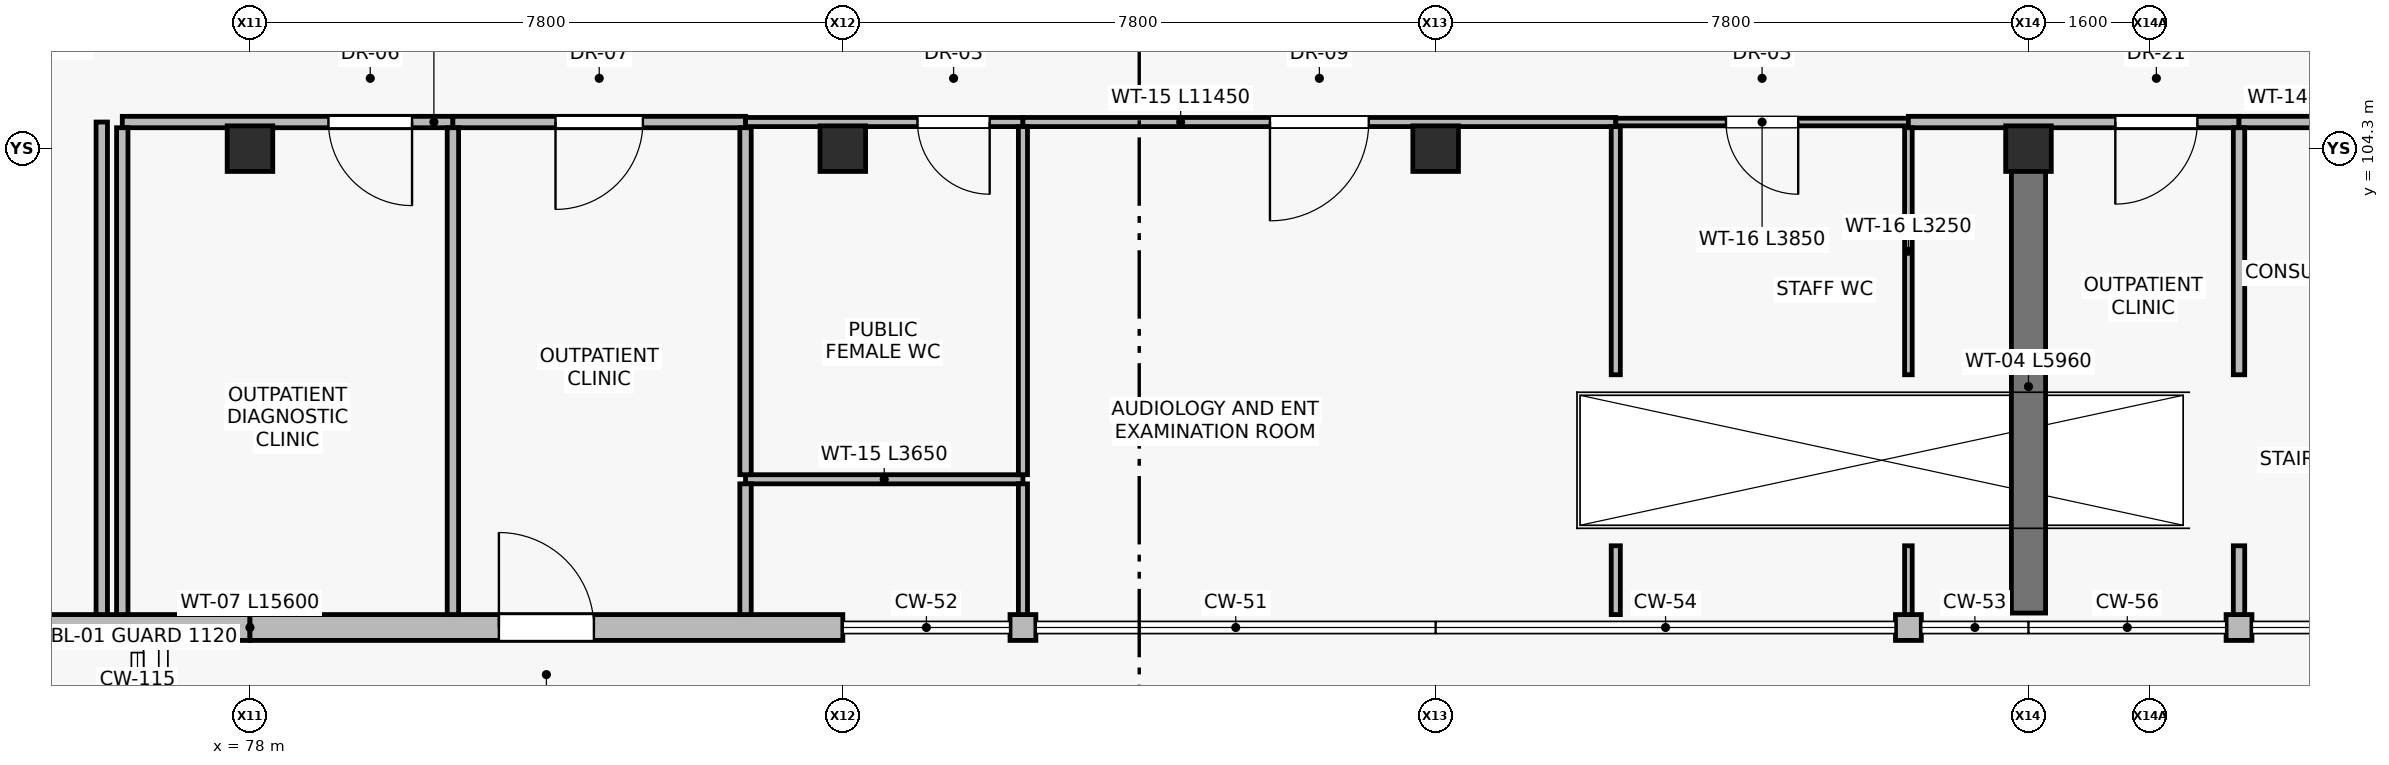
"""IFC4 building model, lengths in metres.
Left out: names, types, materials, properties, quantities, classifications, styles, units other than length and angle.
Written with IfcOpenShell. Run it as: python <this file> out.ifc"""

import sys

from ifc_helpers import new_model, si_unit, direction, frame, frame_2d, origin, origin_2d, place, context, subcontext, project, spatial, rectangle, extrude, element, fill, save


model = new_model("IFC4")
c1 = context("Model", 3, precision=1e-05, world=origin(), true_north=direction((0.0, 1.0)))
c2 = subcontext(c1, "Body", "Model", "MODEL_VIEW")
j1 = project(units=[si_unit("LENGTHUNIT", "METRE"), si_unit("PLANEANGLEUNIT", "RADIAN")], contexts=[c1])
p1 = place(None, origin())
s1 = spatial("IfcSite", under=j1, at=p1, CompositionType="ELEMENT")
p2 = place(p1, origin())
s2 = spatial("IfcBuilding", under=s1, at=p2, CompositionType="ELEMENT")
p3 = place(p2, frame((0.0, 0.0, 4.8)))
s3 = spatial("IfcBuildingStorey", under=s2, at=p3, CompositionType="ELEMENT", Elevation=4.8)
for number, where, z_axis, x_axis in (
    (1, (78.0, 104.3, 0.0), (0.0, 0.0, 1.0), (1.0, 0.0, 0.0)),
    (2, (85.8, 104.3, 0.0), (0.0, 0.0, 1.0), (1.0, 0.0, 0.0)),
    (3, (93.6, 104.3, 0.0), (0.0, 0.0, 1.0), (1.0, 0.0, 0.0)),
    (4, (101.4, 104.3, 0.0), (0.0, 0.0, 1.0), (1.0, 0.0, 0.0)),
):
    element("IfcColumn", number, at=place(p3, frame(where, z_axis=z_axis, x_axis=x_axis)), inside=s3, PredefinedType="COLUMN", context=c2, shape_type="SweptSolid", body=[
        extrude(rectangle(XDim=0.6, YDim=0.6, at=origin_2d()), origin(), (0.0, 0.0, 1.0), 4.8),
    ])
p4 = place(p3, frame((78.0, 98.0, 0.0), z_axis=(0.0, 0.0, 1.0), x_axis=(-1.0, 0.0, 0.0)))
e5 = element("IfcWall", 5, at=p4, inside=s3, PredefinedType="STANDARD", context=c2, shape_type="SweptSolid", body=[
    extrude(rectangle(XDim=7.8, YDim=0.34, at=frame_2d((3.9, 0.0))), origin(), (0.0, 0.0, 1.0), 4.54),
])
p5 = place(p4, frame((2.8, 0.0, 0.0)))
e6 = element("IfcOpeningElement", 6, at=p5, cuts=e5, PredefinedType="OPENING", context=c2, shape_type="SweptSolid", body=[
    extrude(rectangle(XDim=1.6, YDim=2.2, at=frame_2d((0.8, 1.1))), frame((0.0, 0.18, 0.0), z_axis=(0.0, -1.0, 0.0), x_axis=(1.0, 0.0, 0.0)), (0.0, 0.0, 1.0), 0.36),
])
p6 = place(p3, frame((85.8, 98.0, 0.0), z_axis=(0.0, 0.0, 1.0), x_axis=(-1.0, 0.0, 0.0)))
e7 = element("IfcWall", 7, at=p6, inside=s3, PredefinedType="STANDARD", context=c2, shape_type="SweptSolid", body=[
    extrude(rectangle(XDim=7.8, YDim=0.34, at=frame_2d((3.9, 0.0))), origin(), (0.0, 0.0, 1.0), 4.54),
])
p7 = place(p6, frame((3.275, 0.0, 0.0)))
e8 = element("IfcOpeningElement", 8, at=p7, cuts=e7, PredefinedType="OPENING", context=c2, shape_type="SweptSolid", body=[
    extrude(rectangle(XDim=1.25, YDim=2.2, at=frame_2d((0.625, 1.1))), frame((0.0, 0.18, 0.0), z_axis=(0.0, -1.0, 0.0), x_axis=(1.0, 0.0, 0.0)), (0.0, 0.0, 1.0), 0.36),
])
for number, where, z_axis, x_axis in (
    (9, (88.34, 98.0, 0.0), (0.0, 0.0, 1.0), (-1.0, 0.0, 0.0)),
    (10, (99.99, 98.0, 0.0), (0.0, 0.0, 1.0), (-1.0, 0.0, 0.0)),
    (11, (104.34, 98.0, 0.0), (0.0, 0.0, 1.0), (-1.0, 0.0, 0.0)),
):
    element("IfcWall", number, at=place(p3, frame(where, z_axis=z_axis, x_axis=x_axis)), inside=s3, PredefinedType="STANDARD", context=c2, shape_type="SweptSolid", body=[
        extrude(rectangle(XDim=0.34, YDim=0.34, at=frame_2d((0.17, 0.0))), origin(), (0.0, 0.0, 1.0), 4.54),
    ])
p8 = place(p3, frame((101.4, 98.19, 0.0), z_axis=(0.0, 0.0, 1.0), x_axis=(0.0, 1.0, 0.0)))
e12 = element("IfcWall", 12, at=p8, inside=s3, PredefinedType="SHEAR", context=c2, shape_type="SweptSolid", body=[
    extrude(rectangle(XDim=5.96, YDim=0.45, at=frame_2d((2.98, 0.0))), origin(), (0.0, 0.0, 1.0), 4.54),
])
p9 = place(p3, frame((76.05, 98.17, 0.0), z_axis=(0.0, 0.0, 1.0), x_axis=(0.0, 1.0, 0.0)))
e13 = element("IfcWall", 13, at=p9, inside=s3, PredefinedType="PARTITIONING", context=c2, shape_type="SweptSolid", body=[
    extrude(rectangle(XDim=6.48, YDim=0.15, at=frame_2d((3.24, 0.0))), origin(), (0.0, 0.0, 1.0), 4.54),
])
p10 = place(p3, frame((80.67, 104.65, 0.0), z_axis=(0.0, 0.0, 1.0), x_axis=(-1.0, 0.0, 0.0)))
e14 = element("IfcWall", 14, at=p10, inside=s3, PredefinedType="PARTITIONING", context=c2, shape_type="SweptSolid", body=[
    extrude(rectangle(XDim=4.35, YDim=0.15, at=frame_2d((2.175, 0.0))), origin(), (0.0, 0.0, 1.0), 4.04),
])
p11 = place(p10, frame((0.538, 0.0, 0.0)))
e15 = element("IfcOpeningElement", 15, at=p11, cuts=e14, PredefinedType="OPENING", context=c2, shape_type="SweptSolid", body=[
    extrude(rectangle(XDim=1.1, YDim=2.15, at=frame_2d((0.55, 1.075))), frame((0.0, 0.085, 0.0), z_axis=(0.0, -1.0, 0.0), x_axis=(1.0, 0.0, 0.0)), (0.0, 0.0, 1.0), 0.17),
])
p12 = place(p3, frame((84.52, 104.65, 0.0), z_axis=(0.0, 0.0, 1.0), x_axis=(-1.0, 0.0, 0.0)))
e16 = element("IfcWall", 16, at=p12, inside=s3, PredefinedType="PARTITIONING", context=c2, shape_type="SweptSolid", body=[
    extrude(rectangle(XDim=3.85, YDim=0.15, at=frame_2d((1.925, 0.0))), origin(), (0.0, 0.0, 1.0), 4.04),
])
p13 = place(p12, frame((1.35, 0.0, 0.0)))
e17 = element("IfcOpeningElement", 17, at=p13, cuts=e16, PredefinedType="OPENING", context=c2, shape_type="SweptSolid", body=[
    extrude(rectangle(XDim=1.15, YDim=2.2, at=frame_2d((0.575, 1.1))), frame((0.0, 0.085, 0.0), z_axis=(0.0, -1.0, 0.0), x_axis=(1.0, 0.0, 0.0)), (0.0, 0.0, 1.0), 0.17),
])
p14 = place(p3, frame((88.17, 104.65, 0.0), z_axis=(0.0, 0.0, 1.0), x_axis=(-1.0, 0.0, 0.0)))
e18 = element("IfcWall", 18, at=p14, inside=s3, PredefinedType="PARTITIONING", context=c2, shape_type="SweptSolid", body=[
    extrude(rectangle(XDim=3.65, YDim=0.12, at=frame_2d((1.825, 0.0))), origin(), (0.0, 0.0, 1.0), 4.04),
])
p15 = place(p14, frame((0.438, 0.0, 0.0)))
e19 = element("IfcOpeningElement", 19, at=p15, cuts=e18, PredefinedType="OPENING", context=c2, shape_type="SweptSolid", body=[
    extrude(rectangle(XDim=0.95, YDim=2.1, at=frame_2d((0.475, 1.05))), frame((0.0, 0.07, 0.0), z_axis=(0.0, -1.0, 0.0), x_axis=(1.0, 0.0, 0.0)), (0.0, 0.0, 1.0), 0.14),
])
p16 = place(p3, frame((84.52, 99.95, 0.0), z_axis=(0.0, 0.0, 1.0), x_axis=(1.0, 0.0, 0.0)))
e20 = element("IfcWall", 20, at=p16, inside=s3, PredefinedType="PARTITIONING", context=c2, shape_type="SweptSolid", body=[
    extrude(rectangle(XDim=3.65, YDim=0.12, at=frame_2d((1.825, 0.0))), origin(), (0.0, 0.0, 1.0), 4.54),
])
p17 = place(p3, frame((95.97, 104.65, 0.0), z_axis=(0.0, 0.0, 1.0), x_axis=(-1.0, 0.0, 0.0)))
e21 = element("IfcWall", 21, at=p17, inside=s3, PredefinedType="PARTITIONING", context=c2, shape_type="SweptSolid", body=[
    extrude(rectangle(XDim=7.8, YDim=0.12, at=frame_2d((3.9, 0.0))), origin(), (0.0, 0.0, 1.0), 4.04),
])
p18 = place(p17, frame((3.25, 0.0, 0.0)))
e22 = element("IfcOpeningElement", 22, at=p18, cuts=e21, PredefinedType="OPENING", context=c2, shape_type="SweptSolid", body=[
    extrude(rectangle(XDim=1.3, YDim=2.2, at=frame_2d((0.65, 1.1))), frame((0.0, 0.07, 0.0), z_axis=(0.0, -1.0, 0.0), x_axis=(1.0, 0.0, 0.0)), (0.0, 0.0, 1.0), 0.14),
])
p19 = place(p3, frame((99.82, 104.65, 0.0), z_axis=(0.0, 0.0, 1.0), x_axis=(-1.0, 0.0, 0.0)))
e23 = element("IfcWall", 23, at=p19, inside=s3, PredefinedType="PARTITIONING", context=c2, shape_type="SweptSolid", body=[
    extrude(rectangle(XDim=3.85, YDim=0.1, at=frame_2d((1.925, 0.0))), origin(), (0.0, 0.0, 1.0), 4.04),
])
p20 = place(p19, frame((1.45, 0.0, 0.0)))
e24 = element("IfcOpeningElement", 24, at=p20, cuts=e23, PredefinedType="OPENING", context=c2, shape_type="SweptSolid", body=[
    extrude(rectangle(XDim=0.95, YDim=2.1, at=frame_2d((0.475, 1.05))), frame((0.0, 0.06, 0.0), z_axis=(0.0, -1.0, 0.0), x_axis=(1.0, 0.0, 0.0)), (0.0, 0.0, 1.0), 0.12),
])
p21 = place(p3, frame((104.17, 104.65, 0.0), z_axis=(0.0, 0.0, 1.0), x_axis=(-1.0, 0.0, 0.0)))
e25 = element("IfcWall", 25, at=p21, inside=s3, PredefinedType="PARTITIONING", context=c2, shape_type="SweptSolid", body=[
    extrude(rectangle(XDim=4.35, YDim=0.15, at=frame_2d((2.175, 0.0))), origin(), (0.0, 0.0, 1.0), 4.04),
])
p22 = place(p21, frame((0.548, 0.0, 0.0)))
e26 = element("IfcOpeningElement", 26, at=p22, cuts=e25, PredefinedType="OPENING", context=c2, shape_type="SweptSolid", body=[
    extrude(rectangle(XDim=1.08, YDim=2.2, at=frame_2d((0.54, 1.1))), frame((0.0, 0.085, 0.0), z_axis=(0.0, -1.0, 0.0), x_axis=(1.0, 0.0, 0.0)), (0.0, 0.0, 1.0), 0.17),
])
p23 = place(p3, frame((110.57, 104.65, 0.0), z_axis=(0.0, 0.0, 1.0), x_axis=(-1.0, 0.0, 0.0)))
e27 = element("IfcWall", 27, at=p23, inside=s3, PredefinedType="PARTITIONING", context=c2, shape_type="SweptSolid", body=[
    extrude(rectangle(XDim=6.4, YDim=0.15, at=frame_2d((3.2, 0.0))), origin(), (0.0, 0.0, 1.0), 4.04),
])
p24 = place(p23, frame((2.56, 0.0, 0.0)))
e28 = element("IfcOpeningElement", 28, at=p24, cuts=e27, PredefinedType="OPENING", context=c2, shape_type="SweptSolid", body=[
    extrude(rectangle(XDim=1.28, YDim=2.25, at=frame_2d((0.64, 1.125))), frame((0.0, 0.085, 0.0), z_axis=(0.0, -1.0, 0.0), x_axis=(1.0, 0.0, 0.0)), (0.0, 0.0, 1.0), 0.17),
])
p25 = place(p3, frame((76.32, 98.17, 0.0), z_axis=(0.0, 0.0, 1.0), x_axis=(0.0, 1.0, 0.0)))
e29 = element("IfcWall", 29, at=p25, inside=s3, PredefinedType="PARTITIONING", context=c2, shape_type="SweptSolid", body=[
    extrude(rectangle(XDim=6.405, YDim=0.15, at=frame_2d((3.203, 0.0))), origin(), (0.0, 0.0, 1.0), 4.54),
])
p26 = place(p3, frame((80.67, 98.17, 0.0), z_axis=(0.0, 0.0, 1.0), x_axis=(0.0, 1.0, 0.0)))
e30 = element("IfcWall", 30, at=p26, inside=s3, PredefinedType="PARTITIONING", context=c2, shape_type="SweptSolid", body=[
    extrude(rectangle(XDim=6.405, YDim=0.15, at=frame_2d((3.203, 0.0))), origin(), (0.0, 0.0, 1.0), 4.21),
])
p27 = place(p3, frame((84.52, 98.17, 0.0), z_axis=(0.0, 0.0, 1.0), x_axis=(0.0, 1.0, 0.0)))
e31 = element("IfcWall", 31, at=p27, inside=s3, PredefinedType="PARTITIONING", context=c2, shape_type="SweptSolid", body=[
    extrude(rectangle(XDim=1.72, YDim=0.15, at=frame_2d((0.86, 0.0))), origin(), (0.0, 0.0, 1.0), 4.54),
])
p28 = place(p3, frame((84.52, 100.01, 0.0), z_axis=(0.0, 0.0, 1.0), x_axis=(0.0, 1.0, 0.0)))
e32 = element("IfcWall", 32, at=p28, inside=s3, PredefinedType="PARTITIONING", context=c2, shape_type="SweptSolid", body=[
    extrude(rectangle(XDim=4.565, YDim=0.15, at=frame_2d((2.282, 0.0))), origin(), (0.0, 0.0, 1.0), 4.54),
])
p29 = place(p3, frame((88.17, 100.01, 0.0), z_axis=(0.0, 0.0, 1.0), x_axis=(0.0, 1.0, 0.0)))
e33 = element("IfcWall", 33, at=p29, inside=s3, PredefinedType="PARTITIONING", context=c2, shape_type="SweptSolid", body=[
    extrude(rectangle(XDim=4.58, YDim=0.12, at=frame_2d((2.29, 0.0))), origin(), (0.0, 0.0, 1.0), 4.21),
])
p30 = place(p3, frame((88.17, 98.17, 0.0), z_axis=(0.0, 0.0, 1.0), x_axis=(0.0, 1.0, 0.0)))
e34 = element("IfcWall", 34, at=p30, inside=s3, PredefinedType="PARTITIONING", context=c2, shape_type="SweptSolid", body=[
    extrude(rectangle(XDim=1.72, YDim=0.12, at=frame_2d((0.86, 0.0))), origin(), (0.0, 0.0, 1.0), 4.21),
])
p31 = place(p3, frame((95.97, 98.17, 0.0), z_axis=(0.0, 0.0, 1.0), x_axis=(0.0, 1.0, 0.0)))
e35 = element("IfcWall", 35, at=p31, inside=s3, PredefinedType="PARTITIONING", context=c2, shape_type="SweptSolid", body=[
    extrude(rectangle(XDim=0.905, YDim=0.12, at=frame_2d((0.453, 0.0))), origin(), (0.0, 0.0, 1.0), 4.21),
])
p32 = place(p3, frame((95.97, 101.325, 0.0), z_axis=(0.0, 0.0, 1.0), x_axis=(0.0, 1.0, 0.0)))
e36 = element("IfcWall", 36, at=p32, inside=s3, PredefinedType="PARTITIONING", context=c2, shape_type="SweptSolid", body=[
    extrude(rectangle(XDim=3.265, YDim=0.12, at=frame_2d((1.633, 0.0))), origin(), (0.0, 0.0, 1.0), 4.21),
])
p33 = place(p3, frame((99.82, 98.17, 0.0), z_axis=(0.0, 0.0, 1.0), x_axis=(0.0, 1.0, 0.0)))
e37 = element("IfcWall", 37, at=p33, inside=s3, PredefinedType="PARTITIONING", context=c2, shape_type="SweptSolid", body=[
    extrude(rectangle(XDim=0.905, YDim=0.1, at=frame_2d((0.453, 0.0))), origin(), (0.0, 0.0, 1.0), 4.54),
])
p34 = place(p3, frame((99.82, 101.325, 0.0), z_axis=(0.0, 0.0, 1.0), x_axis=(0.0, 1.0, 0.0)))
e38 = element("IfcWall", 38, at=p34, inside=s3, PredefinedType="PARTITIONING", context=c2, shape_type="SweptSolid", body=[
    extrude(rectangle(XDim=3.25, YDim=0.1, at=frame_2d((1.625, 0.0))), origin(), (0.0, 0.0, 1.0), 4.54),
])
p35 = place(p3, frame((104.17, 98.17, 0.0), z_axis=(0.0, 0.0, 1.0), x_axis=(0.0, 1.0, 0.0)))
e39 = element("IfcWall", 39, at=p35, inside=s3, PredefinedType="PARTITIONING", context=c2, shape_type="SweptSolid", body=[
    extrude(rectangle(XDim=0.905, YDim=0.15, at=frame_2d((0.453, 0.0))), origin(), (0.0, 0.0, 1.0), 4.21),
])
p36 = place(p3, frame((104.17, 101.325, 0.0), z_axis=(0.0, 0.0, 1.0), x_axis=(0.0, 1.0, 0.0)))
e40 = element("IfcWall", 40, at=p36, inside=s3, PredefinedType="PARTITIONING", context=c2, shape_type="SweptSolid", body=[
    extrude(rectangle(XDim=3.25, YDim=0.15, at=frame_2d((1.625, 0.0))), origin(), (0.0, 0.0, 1.0), 4.21),
])
p37 = place(p7, frame((1.25, 0.0, 0.0), z_axis=(0.0, 0.0, 1.0), x_axis=(-1.0, 0.0, 0.0)))
e41 = element("IfcDoor", 41, at=p37, inside=s3, OperationType="SINGLE_SWING_RIGHT", PredefinedType="DOOR", context=c2, shape_type="SweptSolid", body=[
    extrude(rectangle(XDim=1.25, YDim=2.2, at=frame_2d((0.625, 1.1))), frame((0.0, 0.025, 0.0), z_axis=(0.0, -1.0, 0.0), x_axis=(1.0, 0.0, 0.0)), (0.0, 0.0, 1.0), 0.05),
])
fill(e8, e41)
p38 = place(p11, origin())
e42 = element("IfcDoor", 42, at=p38, inside=s3, OperationType="SINGLE_SWING_LEFT", PredefinedType="DOOR", context=c2, shape_type="SweptSolid", body=[
    extrude(rectangle(XDim=1.1, YDim=2.15, at=frame_2d((0.55, 1.075))), frame((0.0, 0.025, 0.0), z_axis=(0.0, -1.0, 0.0), x_axis=(1.0, 0.0, 0.0)), (0.0, 0.0, 1.0), 0.05),
])
fill(e15, e42)
p39 = place(p13, origin())
e43 = element("IfcDoor", 43, at=p39, inside=s3, OperationType="SINGLE_SWING_RIGHT", PredefinedType="DOOR", context=c2, shape_type="SweptSolid", body=[
    extrude(rectangle(XDim=1.15, YDim=2.2, at=frame_2d((0.575, 1.1))), frame((0.0, 0.025, 0.0), z_axis=(0.0, -1.0, 0.0), x_axis=(1.0, 0.0, 0.0)), (0.0, 0.0, 1.0), 0.05),
])
fill(e17, e43)
p40 = place(p15, origin())
e44 = element("IfcDoor", 44, at=p40, inside=s3, OperationType="SINGLE_SWING_LEFT", PredefinedType="DOOR", context=c2, shape_type="SweptSolid", body=[
    extrude(rectangle(XDim=0.95, YDim=2.1, at=frame_2d((0.475, 1.05))), frame((0.0, 0.025, 0.0), z_axis=(0.0, -1.0, 0.0), x_axis=(1.0, 0.0, 0.0)), (0.0, 0.0, 1.0), 0.05),
])
fill(e19, e44)
p41 = place(p18, origin())
e45 = element("IfcDoor", 45, at=p41, inside=s3, OperationType="SINGLE_SWING_RIGHT", PredefinedType="DOOR", context=c2, shape_type="SweptSolid", body=[
    extrude(rectangle(XDim=1.3, YDim=2.2, at=frame_2d((0.65, 1.1))), frame((0.0, 0.025, 0.0), z_axis=(0.0, -1.0, 0.0), x_axis=(1.0, 0.0, 0.0)), (0.0, 0.0, 1.0), 0.05),
])
fill(e22, e45)
p42 = place(p20, origin())
e46 = element("IfcDoor", 46, at=p42, inside=s3, OperationType="SINGLE_SWING_LEFT", PredefinedType="DOOR", context=c2, shape_type="SweptSolid", body=[
    extrude(rectangle(XDim=0.95, YDim=2.1, at=frame_2d((0.475, 1.05))), frame((0.0, 0.025, 0.0), z_axis=(0.0, -1.0, 0.0), x_axis=(1.0, 0.0, 0.0)), (0.0, 0.0, 1.0), 0.05),
])
fill(e24, e46)
p43 = place(p22, origin())
e47 = element("IfcDoor", 47, at=p43, inside=s3, OperationType="SINGLE_SWING_RIGHT", PredefinedType="DOOR", context=c2, shape_type="SweptSolid", body=[
    extrude(rectangle(XDim=1.08, YDim=2.2, at=frame_2d((0.54, 1.1))), frame((0.0, 0.025, 0.0), z_axis=(0.0, -1.0, 0.0), x_axis=(1.0, 0.0, 0.0)), (0.0, 0.0, 1.0), 0.05),
])
fill(e26, e47)
save(model, sys.argv[1])
